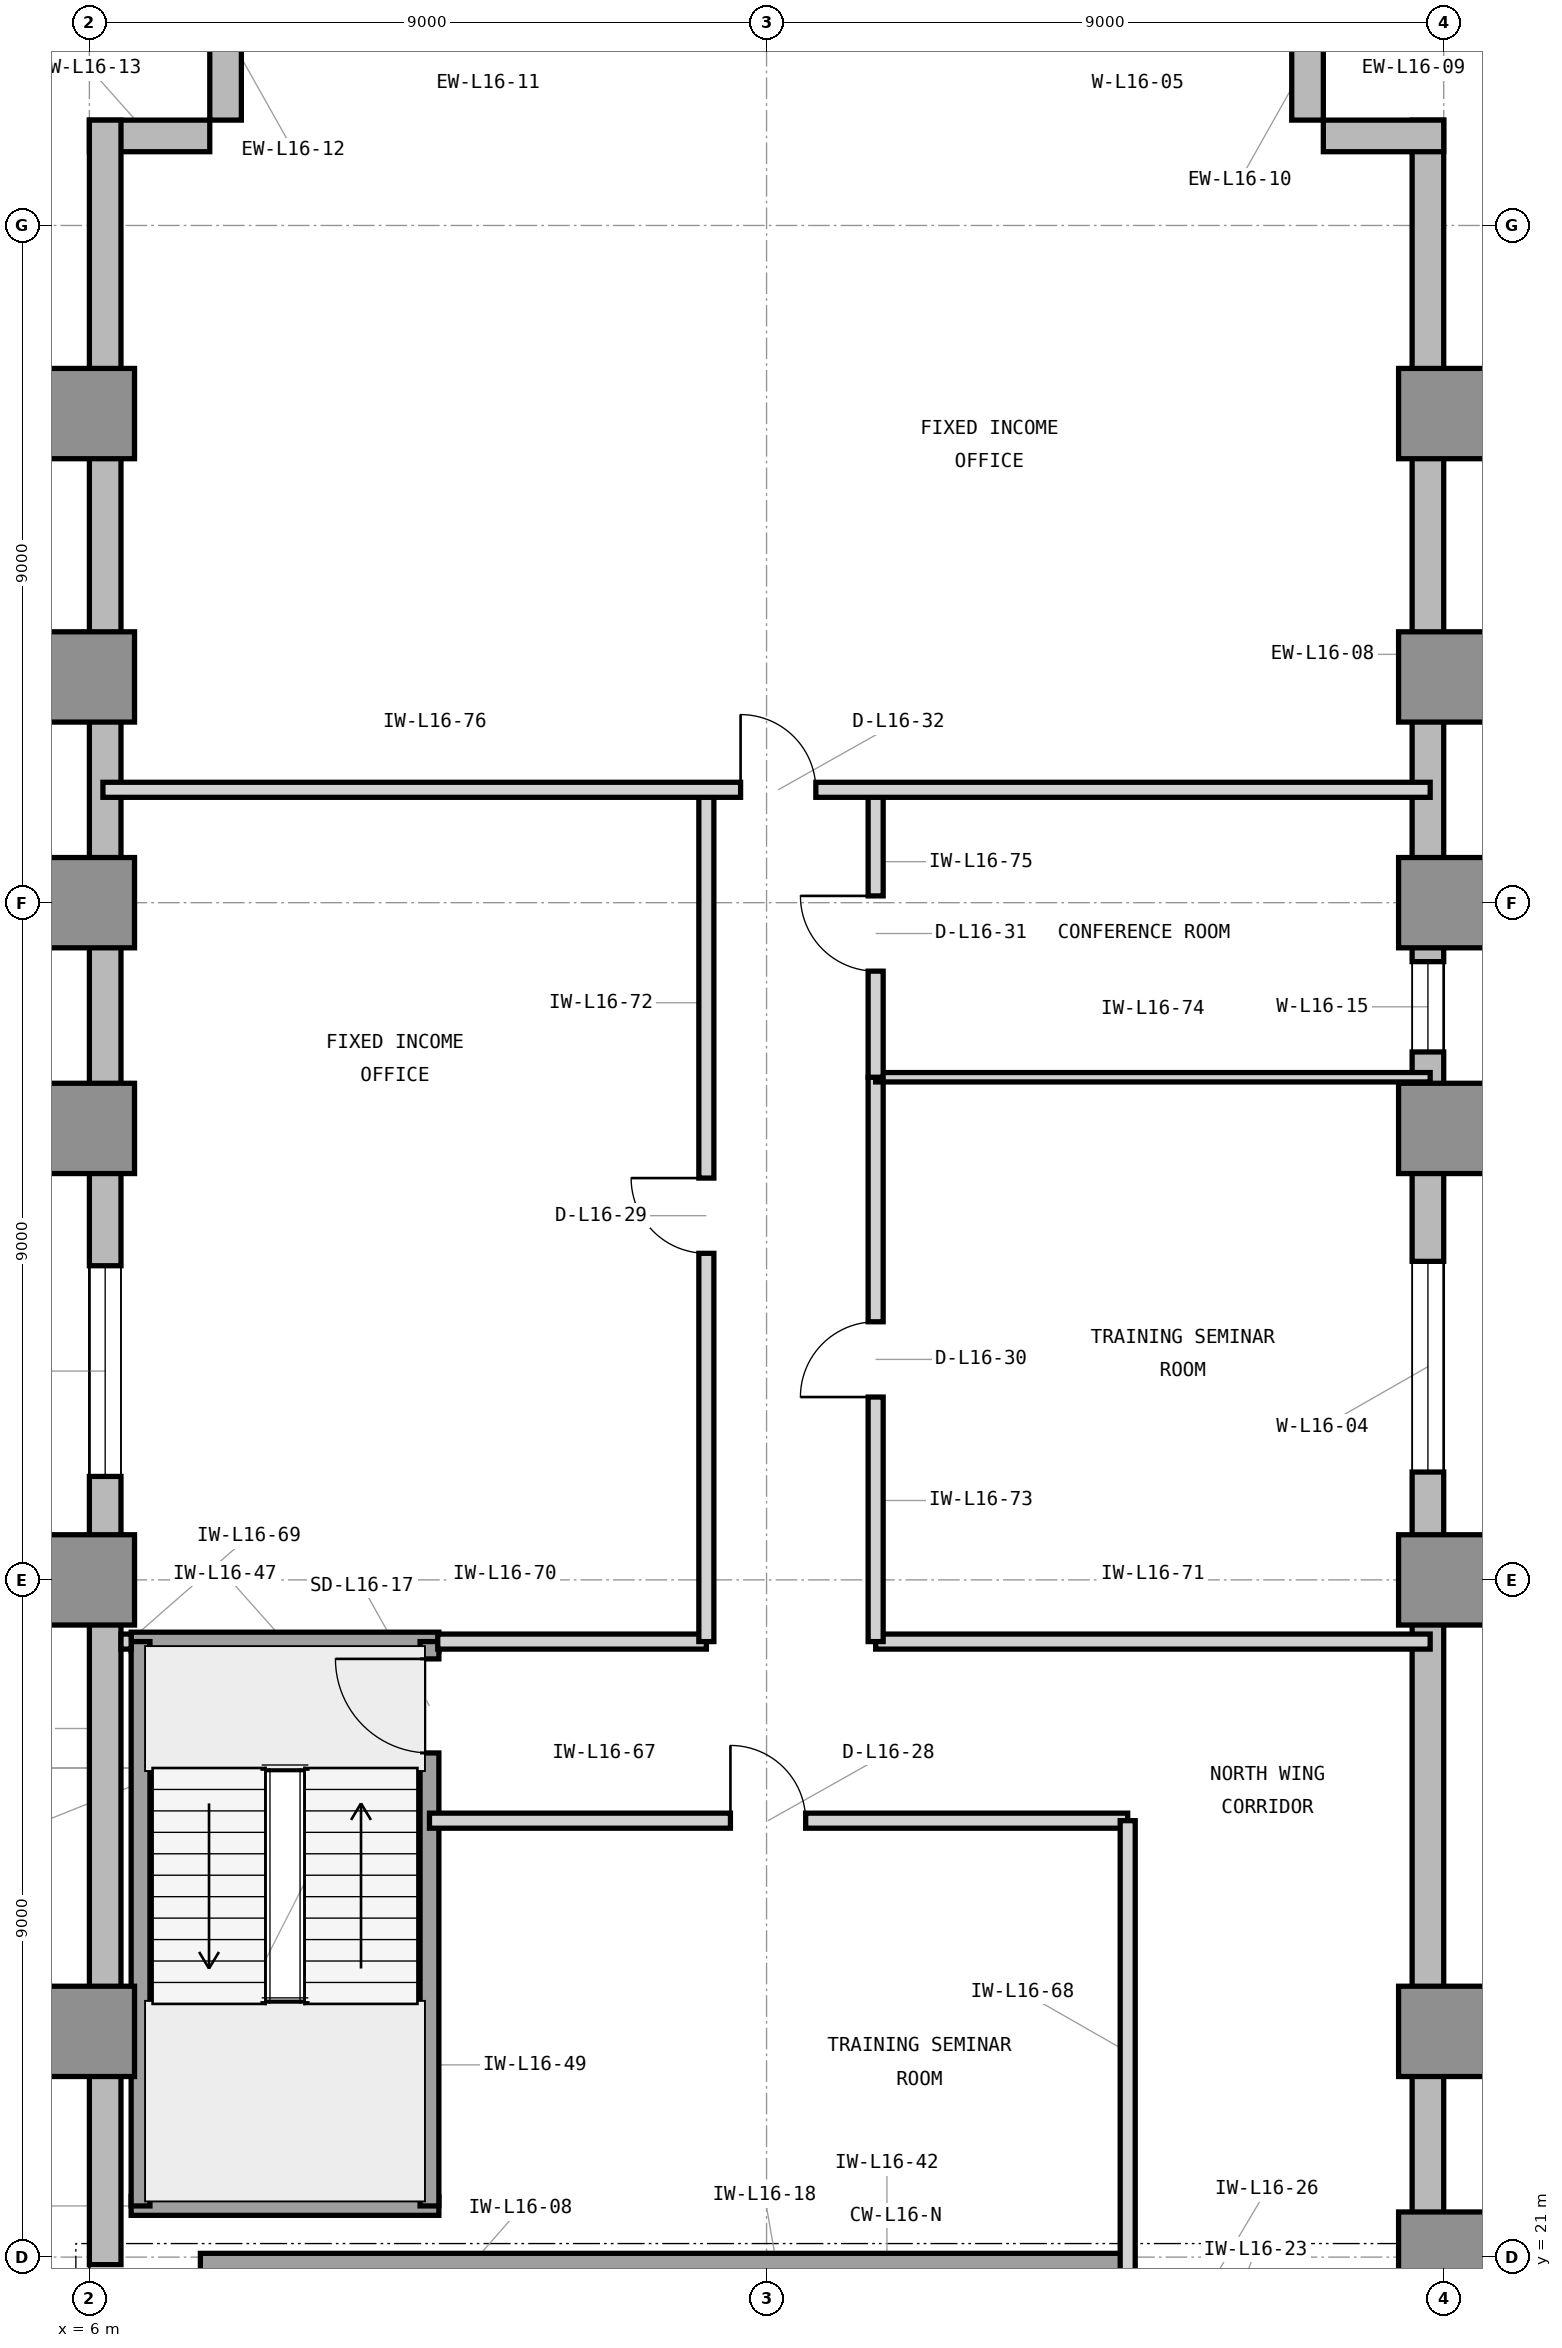
"""IFC4 building model, lengths in metres.
Left out: names, types, materials, properties, quantities, classifications, styles, units other than length and angle.
Written with IfcOpenShell. Run it as: python <this file> out.ifc"""

import sys

from ifc_helpers import new_model, si_unit, direction, frame, frame_2d, origin, origin_2d, place, context, subcontext, project, spatial, rectangle, extrude, element, fill, save


model = new_model("IFC4")
c1 = context("Model", 3, precision=1e-05, world=origin(), true_north=direction((0.0, 1.0)))
c2 = subcontext(c1, "Body", "Model", "MODEL_VIEW")
j1 = project(units=[si_unit("LENGTHUNIT", "METRE"), si_unit("PLANEANGLEUNIT", "RADIAN")], contexts=[c1])
p1 = place(None, origin())
s1 = spatial("IfcSite", under=j1, at=p1, CompositionType="ELEMENT")
p2 = place(p1, origin())
s2 = spatial("IfcBuilding", under=s1, at=p2, CompositionType="ELEMENT")
p3 = place(p2, frame((0.0, 0.0, 72.0)))
s3 = spatial("IfcBuildingStorey", under=s2, at=p3, CompositionType="ELEMENT", Elevation=72.0)
p4 = place(p3, frame((7.475, 20.65, 0.0), z_axis=(0.0, 0.0, 1.0), x_axis=(1.0, 0.0, 0.0)))
e1 = element("IfcWall", 1, at=p4, inside=s3, PredefinedType="SHEAR", context=c2, shape_type="SweptSolid", body=[
    extrude(rectangle(XDim=12.325, YDim=0.8, at=frame_2d((6.163, 0.0))), origin(), (0.0, 0.0, 1.0), 4.2),
])
for number, where, z_axis, x_axis in (
    (2, (24.0, 21.0, 0.0), (0.0, 0.0, 1.0), (1.0, 0.0, 0.0)),
    (3, (6.0, 24.0, 0.0), (0.0, 0.0, 1.0), (1.0, 0.0, 0.0)),
    (4, (24.0, 24.0, 0.0), (0.0, 0.0, 1.0), (1.0, 0.0, 0.0)),
    (5, (6.0, 30.0, 0.0), (0.0, 0.0, 1.0), (1.0, 0.0, 0.0)),
    (6, (24.0, 30.0, 0.0), (0.0, 0.0, 1.0), (1.0, 0.0, 0.0)),
    (7, (6.0, 36.0, 0.0), (0.0, 0.0, 1.0), (1.0, 0.0, 0.0)),
    (8, (24.0, 36.0, 0.0), (0.0, 0.0, 1.0), (1.0, 0.0, 0.0)),
    (9, (6.0, 39.0, 0.0), (0.0, 0.0, 1.0), (1.0, 0.0, 0.0)),
    (10, (24.0, 39.0, 0.0), (0.0, 0.0, 1.0), (1.0, 0.0, 0.0)),
    (11, (6.0, 42.0, 0.0), (0.0, 0.0, 1.0), (1.0, 0.0, 0.0)),
    (12, (24.0, 42.0, 0.0), (0.0, 0.0, 1.0), (1.0, 0.0, 0.0)),
    (13, (6.0, 45.5, 0.0), (0.0, 0.0, 1.0), (1.0, 0.0, 0.0)),
    (14, (24.0, 45.5, 0.0), (0.0, 0.0, 1.0), (1.0, 0.0, 0.0)),
):
    element("IfcColumn", number, at=place(p3, frame(where, z_axis=z_axis, x_axis=x_axis)), inside=s3, PredefinedType="COLUMN", context=c2, shape_type="SweptSolid", body=[
        extrude(rectangle(XDim=1.2, YDim=1.2, at=origin_2d()), origin(), (0.0, 0.0, 1.0), 4.2),
    ])
p5 = place(p3, frame((64.4, 20.79, 0.0), z_axis=(0.0, 0.0, 1.0), x_axis=(-1.0, 0.0, 0.0)))
e15 = element("IfcWall", 15, at=p5, inside=s3, PredefinedType="STANDARD", context=c2, shape_type="SweptSolid", body=[
    extrude(rectangle(XDim=40.4, YDim=0.42, at=frame_2d((20.2, 0.0))), origin(), (0.0, 0.0, 1.0), 3.98),
])
p6 = place(p5, frame((26.375, 0.0, 0.85)))
e16 = element("IfcOpeningElement", 16, at=p6, cuts=e15, PredefinedType="OPENING", context=c2, shape_type="SweptSolid", body=[
    extrude(rectangle(XDim=2.8, YDim=2.45, at=frame_2d((1.4, 1.225))), frame((0.0, 0.22, 0.0), z_axis=(0.0, -1.0, 0.0), x_axis=(1.0, 0.0, 0.0)), (0.0, 0.0, 1.0), 0.44),
])
p7 = place(p5, frame((38.222, 0.0, 0.85)))
e17 = element("IfcOpeningElement", 17, at=p7, cuts=e15, PredefinedType="OPENING", context=c2, shape_type="SweptSolid", body=[
    extrude(rectangle(XDim=1.2, YDim=2.45, at=frame_2d((0.6, 1.225))), frame((0.0, 0.22, 0.0), z_axis=(0.0, -1.0, 0.0), x_axis=(1.0, 0.0, 0.0)), (0.0, 0.0, 1.0), 0.44),
])
p8 = place(p5, frame((32.536, 0.0, 0.85)))
e18 = element("IfcOpeningElement", 18, at=p8, cuts=e15, PredefinedType="OPENING", context=c2, shape_type="SweptSolid", body=[
    extrude(rectangle(XDim=2.8, YDim=2.45, at=frame_2d((1.4, 1.225))), frame((0.0, 0.22, 0.0), z_axis=(0.0, -1.0, 0.0), x_axis=(1.0, 0.0, 0.0)), (0.0, 0.0, 1.0), 0.44),
])
p9 = place(p5, frame((17.386, 0.0, 0.85)))
e19 = element("IfcOpeningElement", 19, at=p9, cuts=e15, PredefinedType="OPENING", context=c2, shape_type="SweptSolid", body=[
    extrude(rectangle(XDim=2.8, YDim=2.45, at=frame_2d((1.4, 1.225))), frame((0.0, 0.22, 0.0), z_axis=(0.0, -1.0, 0.0), x_axis=(1.0, 0.0, 0.0)), (0.0, 0.0, 1.0), 0.44),
])
p10 = place(p3, frame((23.79, 21.0, 0.0), z_axis=(0.0, 0.0, 1.0), x_axis=(0.0, 1.0, 0.0)))
e20 = element("IfcWall", 20, at=p10, inside=s3, PredefinedType="STANDARD", context=c2, shape_type="SweptSolid", body=[
    extrude(rectangle(XDim=28.4, YDim=0.42, at=frame_2d((14.2, 0.0))), origin(), (0.0, 0.0, 1.0), 3.98),
])
p11 = place(p10, frame((10.433, 0.0, 0.85)))
e21 = element("IfcOpeningElement", 21, at=p11, cuts=e20, PredefinedType="OPENING", context=c2, shape_type="SweptSolid", body=[
    extrude(rectangle(XDim=2.8, YDim=2.45, at=frame_2d((1.4, 1.225))), frame((0.0, 0.22, 0.0), z_axis=(0.0, -1.0, 0.0), x_axis=(1.0, 0.0, 0.0)), (0.0, 0.0, 1.0), 0.44),
])
p12 = place(p10, frame((16.016, 0.0, 0.85)))
e22 = element("IfcOpeningElement", 22, at=p12, cuts=e20, PredefinedType="OPENING", context=c2, shape_type="SweptSolid", body=[
    extrude(rectangle(XDim=1.2, YDim=2.45, at=frame_2d((0.6, 1.225))), frame((0.0, 0.22, 0.0), z_axis=(0.0, -1.0, 0.0), x_axis=(1.0, 0.0, 0.0)), (0.0, 0.0, 1.0), 0.44),
])
for number, where, z_axis, x_axis in (
    (23, (24.0, 49.19, 0.0), (0.0, 0.0, 1.0), (-1.0, 0.0, 0.0)),
    (24, (22.19, 49.4, 0.0), (0.0, 0.0, 1.0), (0.0, 1.0, 0.0)),
    (25, (7.81, 51.0, 0.0), (0.0, 0.0, 1.0), (0.0, -1.0, 0.0)),
    (26, (7.6, 49.19, 0.0), (0.0, 0.0, 1.0), (-1.0, 0.0, 0.0)),
):
    element("IfcWall", number, at=place(p3, frame(where, z_axis=z_axis, x_axis=x_axis)), inside=s3, PredefinedType="STANDARD", context=c2, shape_type="SweptSolid", body=[
        extrude(rectangle(XDim=1.6, YDim=0.42, at=frame_2d((0.8, 0.0))), origin(), (0.0, 0.0, 1.0), 3.98),
    ])
p13 = place(p3, frame((6.21, 49.4, 0.0), z_axis=(0.0, 0.0, 1.0), x_axis=(0.0, -1.0, 0.0)))
e27 = element("IfcWall", 27, at=p13, inside=s3, PredefinedType="STANDARD", context=c2, shape_type="SweptSolid", body=[
    extrude(rectangle(XDim=28.5, YDim=0.42, at=frame_2d((14.25, 0.0))), origin(), (0.0, 0.0, 1.0), 3.98),
])
p14 = place(p13, frame((15.225, 0.0, 0.85)))
e28 = element("IfcOpeningElement", 28, at=p14, cuts=e27, PredefinedType="OPENING", context=c2, shape_type="SweptSolid", body=[
    extrude(rectangle(XDim=2.8, YDim=2.45, at=frame_2d((1.4, 1.225))), frame((0.0, 0.22, 0.0), z_axis=(0.0, -1.0, 0.0), x_axis=(1.0, 0.0, 0.0)), (0.0, 0.0, 1.0), 0.44),
])
for number, where, z_axis, x_axis in (
    (29, (6.555, 21.68, 0.0), (0.0, 0.0, 1.0), (1.0, 0.0, 0.0)),
    (30, (6.555, 29.18, 0.0), (0.0, 0.0, 1.0), (1.0, 0.0, 0.0)),
):
    element("IfcWall", number, at=place(p3, frame(where, z_axis=z_axis, x_axis=x_axis)), inside=s3, PredefinedType="SHEAR", context=c2, shape_type="SweptSolid", body=[
        extrude(rectangle(XDim=4.09, YDim=0.25, at=frame_2d((2.045, 0.0))), origin(), (0.0, 0.0, 1.0), 4.2),
    ])
p15 = place(p3, frame((6.68, 21.68, 0.0), z_axis=(0.0, 0.0, 1.0), x_axis=(0.0, 1.0, 0.0)))
e31 = element("IfcWall", 31, at=p15, inside=s3, PredefinedType="SHEAR", context=c2, shape_type="SweptSolid", body=[
    extrude(rectangle(XDim=7.5, YDim=0.25, at=frame_2d((3.75, 0.0))), origin(), (0.0, 0.0, 1.0), 4.2),
])
p16 = place(p3, frame((10.52, 21.68, 0.0), z_axis=(0.0, 0.0, 1.0), x_axis=(0.0, 1.0, 0.0)))
e32 = element("IfcWall", 32, at=p16, inside=s3, PredefinedType="SHEAR", context=c2, shape_type="SweptSolid", body=[
    extrude(rectangle(XDim=7.5, YDim=0.25, at=frame_2d((3.75, 0.0))), origin(), (0.0, 0.0, 1.0), 4.2),
])
p17 = place(p16, frame((6.02, 0.0, 0.0)))
e33 = element("IfcOpeningElement", 33, at=p17, cuts=e32, PredefinedType="OPENING", context=c2, shape_type="SweptSolid", body=[
    extrude(rectangle(XDim=1.25, YDim=2.2, at=frame_2d((0.625, 1.1))), frame((0.0, 0.135, 0.0), z_axis=(0.0, -1.0, 0.0), x_axis=(1.0, 0.0, 0.0)), (0.0, 0.0, 1.0), 0.27),
])
p18 = place(p3, frame((10.52, 26.8, 0.0), z_axis=(0.0, 0.0, 1.0), x_axis=(1.0, 0.0, 0.0)))
e34 = element("IfcWall", 34, at=p18, inside=s3, PredefinedType="PARTITIONING", context=c2, shape_type="SweptSolid", body=[
    extrude(rectangle(XDim=9.28, YDim=0.2, at=frame_2d((4.64, 0.0))), origin(), (0.0, 0.0, 1.0), 3.97),
])
p19 = place(p18, frame((4.0, 0.0, 0.0)))
e35 = element("IfcOpeningElement", 35, at=p19, cuts=e34, PredefinedType="OPENING", context=c2, shape_type="SweptSolid", body=[
    extrude(rectangle(XDim=1.0, YDim=2.15, at=frame_2d((0.5, 1.075))), frame((0.0, 0.11, 0.0), z_axis=(0.0, -1.0, 0.0), x_axis=(1.0, 0.0, 0.0)), (0.0, 0.0, 1.0), 0.22),
])
p20 = place(p3, frame((19.8, 20.65, 0.0), z_axis=(0.0, 0.0, 1.0), x_axis=(0.0, 1.0, 0.0)))
e36 = element("IfcWall", 36, at=p20, inside=s3, PredefinedType="PARTITIONING", context=c2, shape_type="SweptSolid", body=[
    extrude(rectangle(XDim=6.15, YDim=0.2, at=frame_2d((3.075, 0.0))), origin(), (0.0, 0.0, 1.0), 3.97),
])
p21 = place(p3, frame((6.42, 29.18, 0.0), z_axis=(0.0, 0.0, 1.0), x_axis=(1.0, 0.0, 0.0)))
e37 = element("IfcWall", 37, at=p21, inside=s3, PredefinedType="PARTITIONING", context=c2, shape_type="SweptSolid", body=[
    extrude(rectangle(XDim=0.135, YDim=0.2, at=frame_2d((0.067, 0.0))), origin(), (0.0, 0.0, 1.0), 3.97),
])
p22 = place(p3, frame((10.63, 29.18, 0.0), z_axis=(0.0, 0.0, 1.0), x_axis=(1.0, 0.0, 0.0)))
e38 = element("IfcWall", 38, at=p22, inside=s3, PredefinedType="PARTITIONING", context=c2, shape_type="SweptSolid", body=[
    extrude(rectangle(XDim=3.57, YDim=0.2, at=frame_2d((1.785, 0.0))), origin(), (0.0, 0.0, 1.0), 3.97),
])
p23 = place(p3, frame((16.45, 29.18, 0.0), z_axis=(0.0, 0.0, 1.0), x_axis=(1.0, 0.0, 0.0)))
e39 = element("IfcWall", 39, at=p23, inside=s3, PredefinedType="PARTITIONING", context=c2, shape_type="SweptSolid", body=[
    extrude(rectangle(XDim=7.37, YDim=0.2, at=frame_2d((3.685, 0.0))), origin(), (0.0, 0.0, 1.0), 3.97),
])
p24 = place(p3, frame((14.2, 29.18, 0.0), z_axis=(0.0, 0.0, 1.0), x_axis=(0.0, 1.0, 0.0)))
e40 = element("IfcWall", 40, at=p24, inside=s3, PredefinedType="PARTITIONING", context=c2, shape_type="SweptSolid", body=[
    extrude(rectangle(XDim=11.32, YDim=0.2, at=frame_2d((5.66, 0.0))), origin(), (0.0, 0.0, 1.0), 3.97),
])
p25 = place(p24, frame((5.16, 0.0, 0.0)))
e41 = element("IfcOpeningElement", 41, at=p25, cuts=e40, PredefinedType="OPENING", context=c2, shape_type="SweptSolid", body=[
    extrude(rectangle(XDim=1.0, YDim=2.15, at=frame_2d((0.5, 1.075))), frame((0.0, 0.11, 0.0), z_axis=(0.0, -1.0, 0.0), x_axis=(1.0, 0.0, 0.0)), (0.0, 0.0, 1.0), 0.22),
])
p26 = place(p3, frame((16.45, 29.18, 0.0), z_axis=(0.0, 0.0, 1.0), x_axis=(0.0, 1.0, 0.0)))
e42 = element("IfcWall", 42, at=p26, inside=s3, PredefinedType="PARTITIONING", context=c2, shape_type="SweptSolid", body=[
    extrude(rectangle(XDim=7.5, YDim=0.2, at=frame_2d((3.75, 0.0))), origin(), (0.0, 0.0, 1.0), 3.97),
])
p27 = place(p26, frame((3.25, 0.0, 0.0)))
e43 = element("IfcOpeningElement", 43, at=p27, cuts=e42, PredefinedType="OPENING", context=c2, shape_type="SweptSolid", body=[
    extrude(rectangle(XDim=1.0, YDim=2.15, at=frame_2d((0.5, 1.075))), frame((0.0, 0.11, 0.0), z_axis=(0.0, -1.0, 0.0), x_axis=(1.0, 0.0, 0.0)), (0.0, 0.0, 1.0), 0.22),
])
p28 = place(p3, frame((16.45, 36.68, 0.0), z_axis=(0.0, 0.0, 1.0), x_axis=(1.0, 0.0, 0.0)))
e44 = element("IfcWall", 44, at=p28, inside=s3, PredefinedType="PARTITIONING", context=c2, shape_type="SweptSolid", body=[
    extrude(rectangle(XDim=7.37, YDim=0.125, at=frame_2d((3.685, 0.0))), origin(), (0.0, 0.0, 1.0), 3.97),
])
p29 = place(p3, frame((16.45, 36.68, 0.0), z_axis=(0.0, 0.0, 1.0), x_axis=(0.0, 1.0, 0.0)))
e45 = element("IfcWall", 45, at=p29, inside=s3, PredefinedType="PARTITIONING", context=c2, shape_type="SweptSolid", body=[
    extrude(rectangle(XDim=3.82, YDim=0.2, at=frame_2d((1.91, 0.0))), origin(), (0.0, 0.0, 1.0), 3.97),
])
p30 = place(p29, frame((1.41, 0.0, 0.0)))
e46 = element("IfcOpeningElement", 46, at=p30, cuts=e45, PredefinedType="OPENING", context=c2, shape_type="SweptSolid", body=[
    extrude(rectangle(XDim=1.0, YDim=2.15, at=frame_2d((0.5, 1.075))), frame((0.0, 0.11, 0.0), z_axis=(0.0, -1.0, 0.0), x_axis=(1.0, 0.0, 0.0)), (0.0, 0.0, 1.0), 0.22),
])
p31 = place(p3, frame((6.18, 40.5, 0.0), z_axis=(0.0, 0.0, 1.0), x_axis=(1.0, 0.0, 0.0)))
e47 = element("IfcWall", 47, at=p31, inside=s3, PredefinedType="PARTITIONING", context=c2, shape_type="SweptSolid", body=[
    extrude(rectangle(XDim=17.64, YDim=0.2, at=frame_2d((8.82, 0.0))), origin(), (0.0, 0.0, 1.0), 3.97),
])
p32 = place(p31, frame((8.475, 0.0, 0.0)))
e48 = element("IfcOpeningElement", 48, at=p32, cuts=e47, PredefinedType="OPENING", context=c2, shape_type="SweptSolid", body=[
    extrude(rectangle(XDim=1.0, YDim=2.15, at=frame_2d((0.5, 1.075))), frame((0.0, 0.11, 0.0), z_axis=(0.0, -1.0, 0.0), x_axis=(1.0, 0.0, 0.0)), (0.0, 0.0, 1.0), 0.22),
])
p33 = place(p11, origin())
e49 = element("IfcWindow", 49, at=p33, inside=s3, PartitioningType="SINGLE_PANEL", PredefinedType="WINDOW", context=c2, shape_type="SweptSolid", body=[
    extrude(rectangle(XDim=2.8, YDim=2.45, at=frame_2d((1.4, 1.225))), frame((0.0, 0.11, 0.0), z_axis=(0.0, -1.0, 0.0), x_axis=(1.0, 0.0, 0.0)), (0.0, 0.0, 1.0), 0.06),
])
fill(e21, e49)
p34 = place(p14, origin())
e50 = element("IfcWindow", 50, at=p34, inside=s3, PartitioningType="SINGLE_PANEL", PredefinedType="WINDOW", context=c2, shape_type="SweptSolid", body=[
    extrude(rectangle(XDim=2.8, YDim=2.45, at=frame_2d((1.4, 1.225))), frame((0.0, 0.11, 0.0), z_axis=(0.0, -1.0, 0.0), x_axis=(1.0, 0.0, 0.0)), (0.0, 0.0, 1.0), 0.06),
])
fill(e28, e50)
p35 = place(p17, origin())
e51 = element("IfcDoor", 51, at=p35, inside=s3, OperationType="SINGLE_SWING_RIGHT", PredefinedType="DOOR", context=c2, shape_type="SweptSolid", body=[
    extrude(rectangle(XDim=1.25, YDim=2.2, at=frame_2d((0.625, 1.1))), frame((0.0, 0.025, 0.0), z_axis=(0.0, -1.0, 0.0), x_axis=(1.0, 0.0, 0.0)), (0.0, 0.0, 1.0), 0.05),
])
fill(e33, e51)
p36 = place(p19, origin())
e52 = element("IfcDoor", 52, at=p36, inside=s3, OperationType="SINGLE_SWING_LEFT", PredefinedType="DOOR", context=c2, shape_type="SweptSolid", body=[
    extrude(rectangle(XDim=1.0, YDim=2.15, at=frame_2d((0.5, 1.075))), frame((0.0, 0.025, 0.0), z_axis=(0.0, -1.0, 0.0), x_axis=(1.0, 0.0, 0.0)), (0.0, 0.0, 1.0), 0.05),
])
fill(e35, e52)
p37 = place(p25, origin())
e53 = element("IfcDoor", 53, at=p37, inside=s3, OperationType="SINGLE_SWING_RIGHT", PredefinedType="DOOR", context=c2, shape_type="SweptSolid", body=[
    extrude(rectangle(XDim=1.0, YDim=2.15, at=frame_2d((0.5, 1.075))), frame((0.0, 0.025, 0.0), z_axis=(0.0, -1.0, 0.0), x_axis=(1.0, 0.0, 0.0)), (0.0, 0.0, 1.0), 0.05),
])
fill(e41, e53)
p38 = place(p27, origin())
e54 = element("IfcDoor", 54, at=p38, inside=s3, OperationType="SINGLE_SWING_LEFT", PredefinedType="DOOR", context=c2, shape_type="SweptSolid", body=[
    extrude(rectangle(XDim=1.0, YDim=2.15, at=frame_2d((0.5, 1.075))), frame((0.0, 0.025, 0.0), z_axis=(0.0, -1.0, 0.0), x_axis=(1.0, 0.0, 0.0)), (0.0, 0.0, 1.0), 0.05),
])
fill(e43, e54)
p39 = place(p30, origin())
e55 = element("IfcDoor", 55, at=p39, inside=s3, OperationType="SINGLE_SWING_RIGHT", PredefinedType="DOOR", context=c2, shape_type="SweptSolid", body=[
    extrude(rectangle(XDim=1.0, YDim=2.15, at=frame_2d((0.5, 1.075))), frame((0.0, 0.025, 0.0), z_axis=(0.0, -1.0, 0.0), x_axis=(1.0, 0.0, 0.0)), (0.0, 0.0, 1.0), 0.05),
])
fill(e46, e55)
p40 = place(p32, origin())
e56 = element("IfcDoor", 56, at=p40, inside=s3, OperationType="SINGLE_SWING_LEFT", PredefinedType="DOOR", context=c2, shape_type="SweptSolid", body=[
    extrude(rectangle(XDim=1.0, YDim=2.15, at=frame_2d((0.5, 1.075))), frame((0.0, 0.025, 0.0), z_axis=(0.0, -1.0, 0.0), x_axis=(1.0, 0.0, 0.0)), (0.0, 0.0, 1.0), 0.05),
])
fill(e48, e56)
p41 = place(p12, origin())
e57 = element("IfcWindow", 57, at=p41, inside=s3, PartitioningType="SINGLE_PANEL", PredefinedType="WINDOW", context=c2, shape_type="SweptSolid", body=[
    extrude(rectangle(XDim=1.2, YDim=2.45, at=frame_2d((0.6, 1.225))), frame((0.0, 0.11, 0.0), z_axis=(0.0, -1.0, 0.0), x_axis=(1.0, 0.0, 0.0)), (0.0, 0.0, 1.0), 0.06),
])
fill(e22, e57)
save(model, sys.argv[1])
